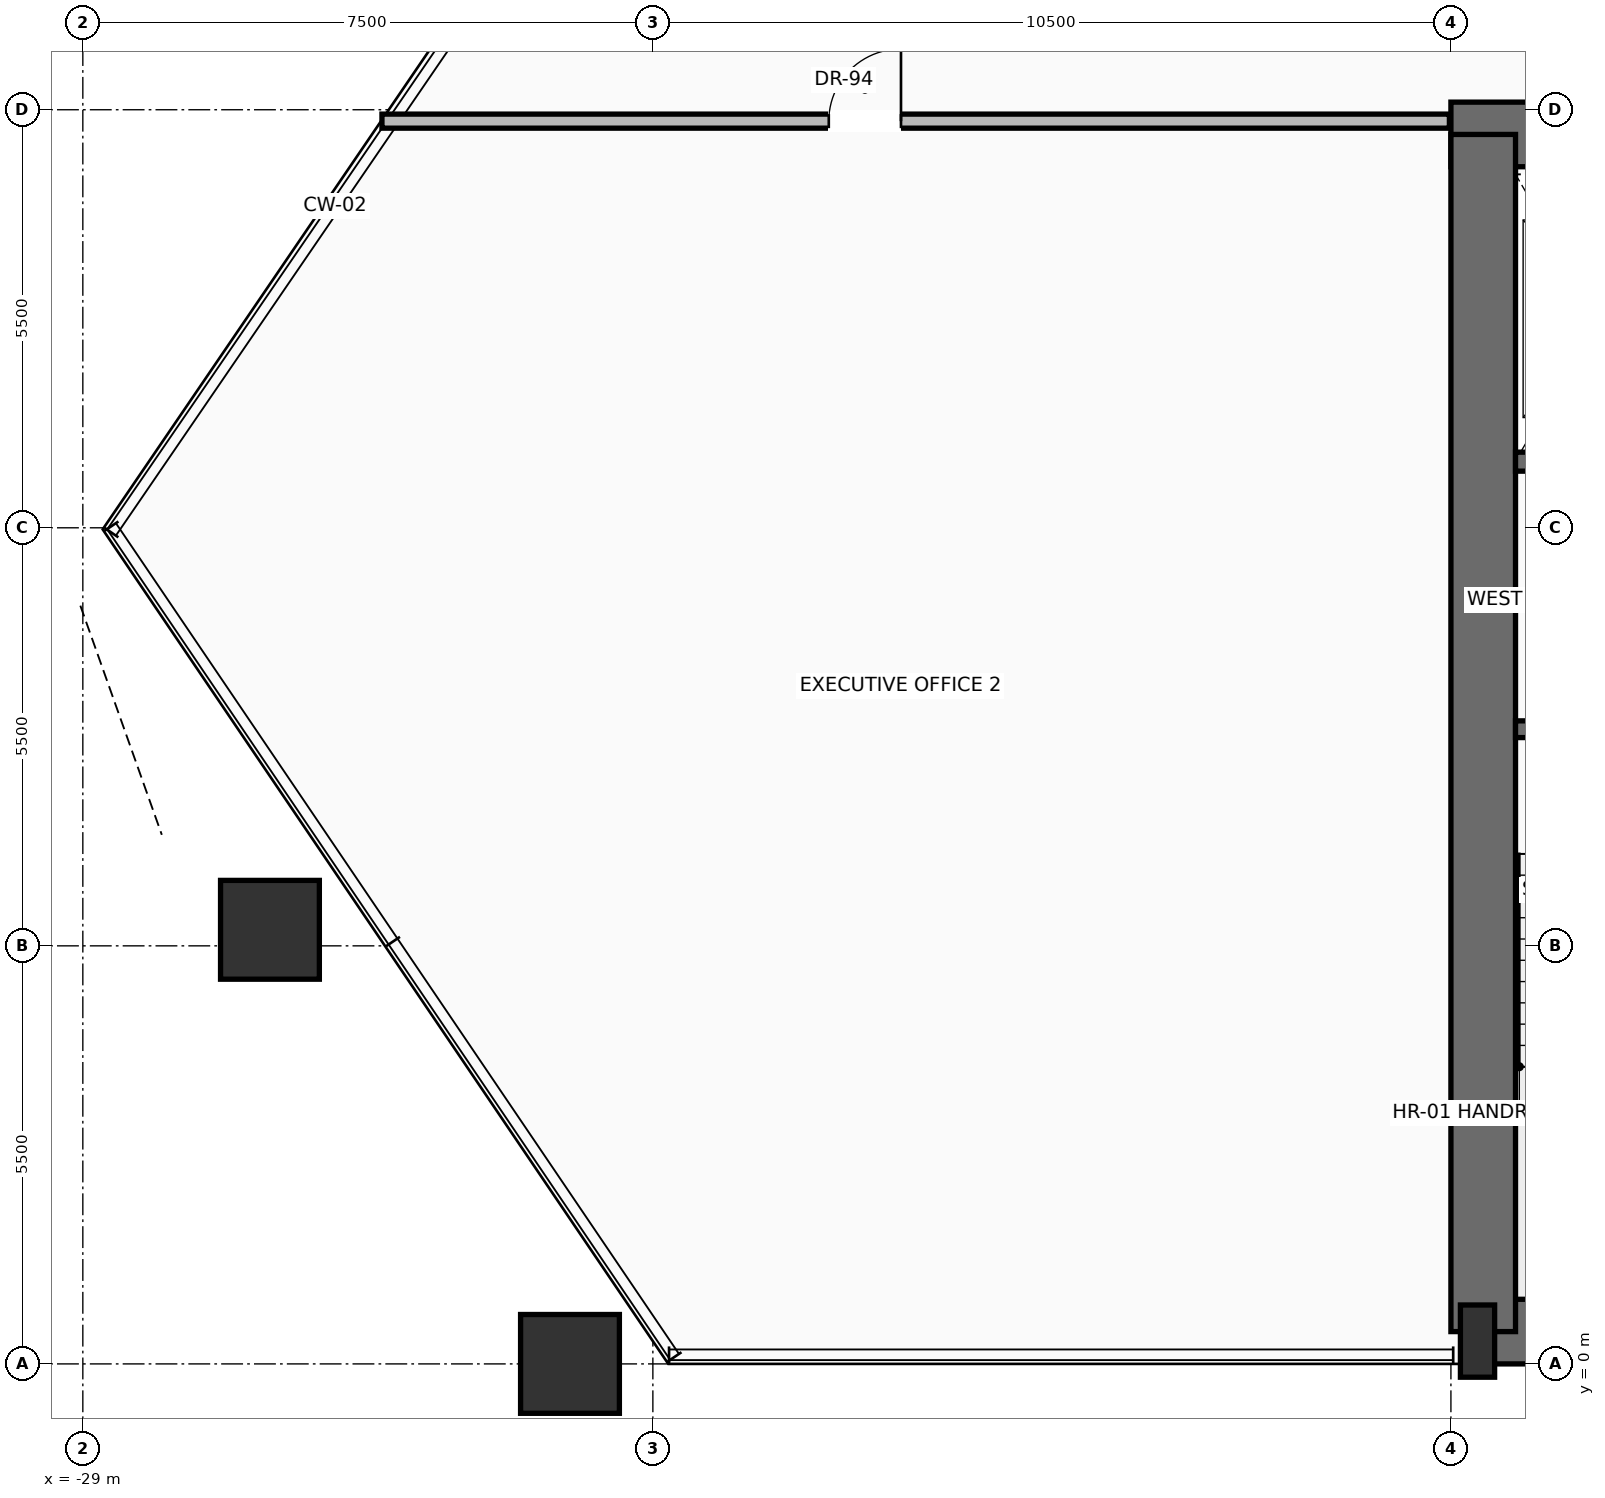
"""IFC4 building model, lengths in metres.
Left out: names, types, materials, properties, quantities, classifications, styles, units other than length and angle.
Written with IfcOpenShell. Run it as: python <this file> out.ifc"""

import sys

from ifc_helpers import new_model, si_unit, direction, frame, frame_2d, origin, origin_2d, place, context, subcontext, project, spatial, rectangle, hollow_rectangle, extrude, source, transform, mapped, element, fill, save


model = new_model("IFC4")
c1 = context("Model", 3, precision=1e-05, world=origin(), true_north=direction((0.0, 1.0)))
c2 = subcontext(c1, "Body", "Model", "MODEL_VIEW")
j1 = project(units=[si_unit("LENGTHUNIT", "METRE"), si_unit("PLANEANGLEUNIT", "RADIAN")], contexts=[c1])
p1 = place(None, origin())
s1 = spatial("IfcSite", under=j1, at=p1, CompositionType="ELEMENT")
p2 = place(p1, origin())
s2 = spatial("IfcBuilding", under=s1, at=p2, CompositionType="ELEMENT")
p3 = place(p2, frame((0.0, 0.0, 34.9)))
s3 = spatial("IfcBuildingStorey", under=s2, at=p3, CompositionType="ELEMENT", Elevation=34.9)
p4 = place(p3, frame((-10.65, 0.425, 0.0), z_axis=(0.0, 0.0, 1.0), x_axis=(1.0, 0.0, 0.0)))
e1 = element("IfcWall", 1, at=p4, inside=s3, PredefinedType="SHEAR", context=c2, shape_type="SweptSolid", body=[
    extrude(rectangle(XDim=21.3, YDim=0.85, at=frame_2d((10.65, 0.0))), origin(), (0.0, 0.0, 1.0), 3.45),
])
p5 = place(p3, frame((-11.0, 16.175, 0.0), z_axis=(0.0, 0.0, 1.0), x_axis=(1.0, 0.0, 0.0)))
e2 = element("IfcWall", 2, at=p5, inside=s3, PredefinedType="SHEAR", context=c2, shape_type="SweptSolid", body=[
    extrude(rectangle(XDim=22.0, YDim=0.85, at=frame_2d((11.0, 0.0))), origin(), (0.0, 0.0, 1.0), 3.45),
])
p6 = place(p5, frame((3.57, 0.0, 0.0)))
e3 = element("IfcOpeningElement", 3, at=p6, cuts=e2, PredefinedType="OPENING", context=c2, shape_type="SweptSolid", body=[
    extrude(rectangle(XDim=1.3, YDim=2.3, at=frame_2d((0.65, 1.15))), frame((0.0, 0.435, 0.0), z_axis=(0.0, -1.0, 0.0), x_axis=(1.0, 0.0, 0.0)), (0.0, 0.0, 1.0), 0.87),
])
p7 = place(p5, frame((10.0, 0.0, 0.0)))
e4 = element("IfcOpeningElement", 4, at=p7, cuts=e2, PredefinedType="OPENING", context=c2, shape_type="SweptSolid", body=[
    extrude(rectangle(XDim=2.0, YDim=2.4, at=frame_2d((1.0, 1.2))), frame((0.0, 0.435, 0.0), z_axis=(0.0, -1.0, 0.0), x_axis=(1.0, 0.0, 0.0)), (0.0, 0.0, 1.0), 0.87),
])
p8 = place(p3, frame((-10.575, 0.425, 0.0), z_axis=(0.0, 0.0, 1.0), x_axis=(0.0, 1.0, 0.0)))
e5 = element("IfcWall", 5, at=p8, inside=s3, PredefinedType="SHEAR", context=c2, shape_type="SweptSolid", body=[
    extrude(rectangle(XDim=15.75, YDim=0.85, at=frame_2d((7.875, 0.0))), origin(), (0.0, 0.0, 1.0), 3.45),
])
m1 = source(origin(), c2, "Body", "SweptSolid", [
    extrude(rectangle(XDim=0.45, YDim=0.95, at=origin_2d()), origin(), (0.0, 0.0, 1.0), 3.7),
])
p9 = place(p3, frame((-10.65, 0.3, 0.0), z_axis=(0.0, 0.0, 1.0), x_axis=(1.0, 0.0, 0.0)))
e6 = element("IfcColumn", 6, at=p9, inside=s3, PredefinedType="PILASTER", context=c2, shape_type="MappedRepresentation", body=[
    mapped(m1, transform((0.0, 0.0, 0.0), scale=1.0)),
])
m2 = source(origin(), c2, "Body", "SweptSolid", [
    extrude(hollow_rectangle(XDim=1.3, YDim=1.3, WallThickness=0.065, at=origin_2d()), origin(), (0.0, 0.0, 1.0), 3.692),
])
p10 = place(p3, frame((-22.591, 0.0, 0.004), z_axis=(-0.019110266101, 0.0, 0.99981738219), x_axis=(0.0, -1.0, 0.0)))
e7 = element("IfcColumn", 7, at=p10, inside=s3, PredefinedType="COLUMN", context=c2, shape_type="MappedRepresentation", body=[
    mapped(m2, transform((0.0, 0.0, 0.0), scale=1.0)),
])
m3 = source(origin(), c2, "Body", "SweptSolid", [
    extrude(hollow_rectangle(XDim=1.3, YDim=1.3, WallThickness=0.065, at=origin_2d()), origin(), (0.0, 0.0, 1.0), 3.692),
])
p11 = place(p3, frame((-26.538, 5.711, 0.004), z_axis=(-0.003636966539, -0.017788072709, 0.999835164887), x_axis=(0.979731180479, -0.200316784113, 0.0)))
e8 = element("IfcColumn", 8, at=p11, inside=s3, PredefinedType="COLUMN", context=c2, shape_type="MappedRepresentation", body=[
    mapped(m3, transform((0.0, 0.0, 0.0), scale=1.0)),
])
p12 = place(p3, frame((-5.5, 8.35, 0.0), z_axis=(0.0, 0.0, 1.0), x_axis=(-1.0, 0.0, 0.0)))
e9 = element("IfcWall", 9, at=p12, inside=s3, PredefinedType="SOLIDWALL", context=c2, shape_type="SweptSolid", body=[
    extrude(rectangle(XDim=4.65, YDim=0.22, at=frame_2d((2.325, 0.0))), origin(), (0.0, 0.0, 1.0), 3.45),
])
p13 = place(p12, frame((2.5, 0.0, 0.0)))
e10 = element("IfcOpeningElement", 10, at=p13, cuts=e9, PredefinedType="OPENING", context=c2, shape_type="SweptSolid", body=[
    extrude(rectangle(XDim=1.15, YDim=2.2, at=frame_2d((0.575, 1.1))), frame((0.0, 0.12, 0.0), z_axis=(0.0, -1.0, 0.0), x_axis=(1.0, 0.0, 0.0)), (0.0, 0.0, 1.0), 0.24),
])
p14 = place(p3, frame((-5.5, 11.87, 0.0), z_axis=(0.0, 0.0, 1.0), x_axis=(-1.0, 0.0, 0.0)))
e11 = element("IfcWall", 11, at=p14, inside=s3, PredefinedType="SOLIDWALL", context=c2, shape_type="SweptSolid", body=[
    extrude(rectangle(XDim=4.65, YDim=0.25, at=frame_2d((2.325, 0.0))), origin(), (0.0, 0.0, 1.0), 3.45),
])
p15 = place(p14, frame((2.95, 0.0, 0.0)))
e12 = element("IfcOpeningElement", 12, at=p15, cuts=e11, PredefinedType="OPENING", context=c2, shape_type="SweptSolid", body=[
    extrude(rectangle(XDim=1.2, YDim=2.25, at=frame_2d((0.6, 1.125))), frame((0.0, 0.135, 0.0), z_axis=(0.0, -1.0, 0.0), x_axis=(1.0, 0.0, 0.0)), (0.0, 0.0, 1.0), 0.27),
])
p16 = place(p3, frame((-25.064, 16.35, 0.0), z_axis=(0.0, 0.0, 1.0), x_axis=(1.0, 0.0, 0.0)))
e13 = element("IfcWall", 13, at=p16, inside=s3, PredefinedType="PARTITIONING", context=c2, shape_type="SweptSolid", body=[
    extrude(rectangle(XDim=14.044, YDim=0.185, at=frame_2d((7.022, 0.0))), origin(), (0.0, 0.0, 1.0), 2.747),
])
p17 = place(p16, frame((5.879, 0.0, 0.0)))
e14 = element("IfcOpeningElement", 14, at=p17, cuts=e13, PredefinedType="OPENING", context=c2, shape_type="SweptSolid", body=[
    extrude(rectangle(XDim=0.95, YDim=2.2, at=frame_2d((0.475, 1.1))), frame((0.0, 0.103, 0.0), z_axis=(0.0, -1.0, 0.0), x_axis=(1.0, 0.0, 0.0)), (0.0, 0.0, 1.0), 0.205),
])
m4 = source(origin(), c2, "Body", "SweptSolid", [
    extrude(rectangle(XDim=0.95, YDim=2.2, at=frame_2d((0.475, 1.1))), frame((0.0, 0.025, 0.0), z_axis=(0.0, -1.0, 0.0), x_axis=(1.0, 0.0, 0.0)), (0.0, 0.0, 1.0), 0.05),
])
p18 = place(p17, origin())
e15 = element("IfcDoor", 15, at=p18, inside=s3, OperationType="SINGLE_SWING_RIGHT", PredefinedType="DOOR", context=c2, shape_type="MappedRepresentation", body=[
    mapped(m4, transform((0.0, 0.0, 0.0), scale=1.0)),
])
fill(e14, e15)
save(model, sys.argv[1])
